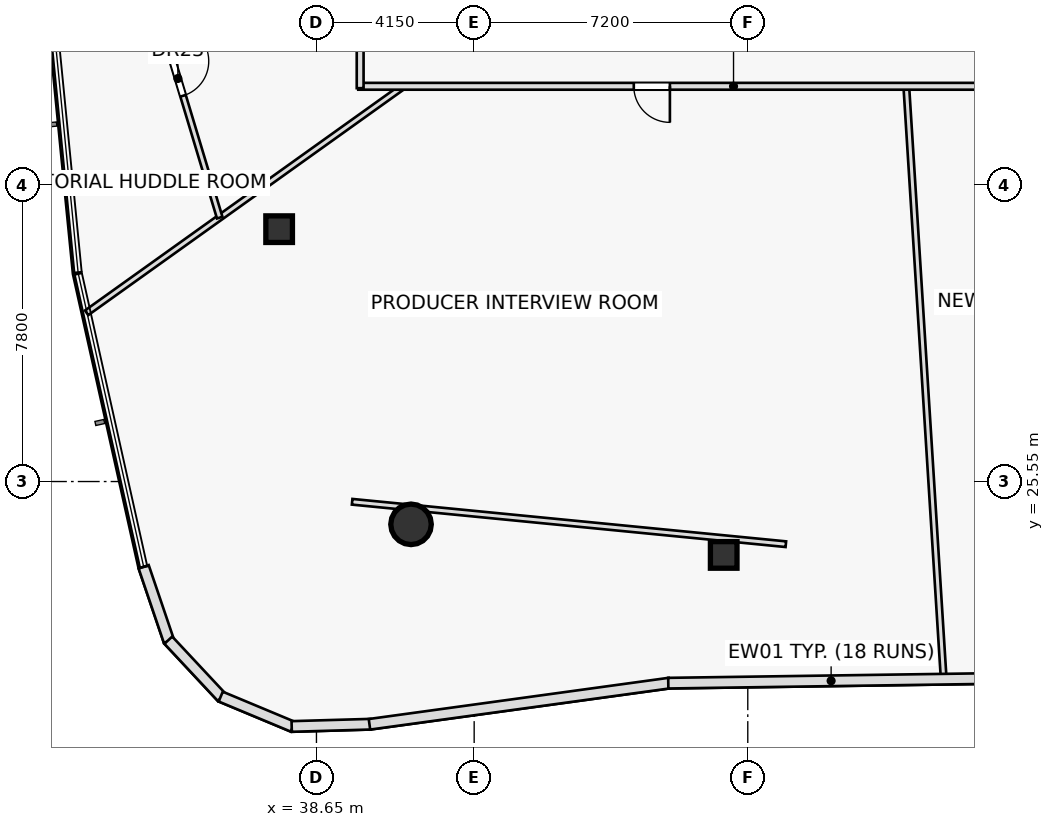
"""IFC4 building model, lengths in metres.
Left out: names, types, materials, properties, quantities, classifications, styles, units other than length and angle.
Written with IfcOpenShell. Run it as: python <this file> out.ifc"""

import sys

from ifc_helpers import new_model, si_unit, direction, frame, frame_2d, origin, origin_2d, place, context, subcontext, project, spatial, rectangle, hollow_rectangle, hollow_circle, extrude, element, fill, save


model = new_model("IFC4")
c1 = context("Model", 3, precision=1e-05, world=origin(), true_north=direction((0.0, 1.0)))
c2 = subcontext(c1, "Body", "Model", "MODEL_VIEW")
j1 = project(units=[si_unit("LENGTHUNIT", "METRE"), si_unit("PLANEANGLEUNIT", "RADIAN")], contexts=[c1])
p1 = place(None, origin())
s1 = spatial("IfcSite", under=j1, at=p1, CompositionType="ELEMENT")
p2 = place(p1, origin())
s2 = spatial("IfcBuilding", under=s1, at=p2, CompositionType="ELEMENT")
p3 = place(p2, frame((0.0, 0.0, 138.7)))
s3 = spatial("IfcBuildingStorey", under=s2, at=p3, CompositionType="ELEMENT", Elevation=138.7)
p4 = place(p3, frame((37.668, 32.19, 0.0), z_axis=(0.0, 0.0, 1.0), x_axis=(1.0, 0.0, 0.0)))
e1 = element("IfcColumn", 1, at=p4, inside=s3, PredefinedType="COLUMN", context=c2, shape_type="SweptSolid", body=[
    extrude(hollow_rectangle(XDim=0.7, YDim=0.7, WallThickness=0.04, at=origin_2d()), origin(), (0.0, 0.0, 1.0), 3.55),
])
p5 = place(p3, frame((41.139, 24.424, 0.0), z_axis=(0.0, 0.0, 1.0), x_axis=(1.0, 0.0, 0.0)))
e2 = element("IfcColumn", 2, at=p5, inside=s3, PredefinedType="COLUMN", context=c2, shape_type="SweptSolid", body=[
    extrude(hollow_circle(Radius=0.533, WallThickness=0.045, at=origin_2d()), origin(), (0.0, 0.0, 1.0), 3.55),
])
p6 = place(p3, frame((49.366, 23.619, 0.0), z_axis=(0.0, 0.0, 1.0), x_axis=(1.0, 0.0, 0.0)))
e3 = element("IfcColumn", 3, at=p6, inside=s3, PredefinedType="COLUMN", context=c2, shape_type="SweptSolid", body=[
    extrude(hollow_rectangle(XDim=0.7, YDim=0.7, WallThickness=0.04, at=origin_2d()), origin(), (0.0, 0.0, 1.0), 3.55),
])
p7 = place(p3, frame((39.589, 25.018, 0.0), z_axis=(0.0, 0.0, 1.0), x_axis=(0.99524905582, -0.097361783517, 0.0)))
e4 = element("IfcWall", 4, at=p7, inside=s3, PredefinedType="PARTITIONING", context=c2, shape_type="SweptSolid", body=[
    extrude(rectangle(XDim=11.467, YDim=0.15, at=frame_2d((5.733, 0.0))), origin(), (0.0, 0.0, 1.0), 2.835),
])
p8 = place(p3, frame((40.94, 35.95, 0.0), z_axis=(0.0, 0.0, 1.0), x_axis=(-0.813525786519, -0.581528842508, 0.0)))
e5 = element("IfcWall", 5, at=p8, inside=s3, PredefinedType="PARTITIONING", context=c2, shape_type="SweptSolid", body=[
    extrude(rectangle(XDim=10.249, YDim=0.15, at=frame_2d((5.125, 0.0))), origin(), (0.0, 0.0, 1.0), 2.835),
])
p9 = place(p3, frame((54.171, 35.95, 0.0), z_axis=(0.0, 0.0, 1.0), x_axis=(0.062994339198, -0.998013884287, 0.0)))
e6 = element("IfcWall", 6, at=p9, inside=s3, PredefinedType="PARTITIONING", context=c2, shape_type="SweptSolid", body=[
    extrude(rectangle(XDim=15.642, YDim=0.15, at=frame_2d((7.821, 0.0))), origin(), (0.0, 0.0, 1.0), 2.975),
])
p10 = place(p3, frame((33.902, 39.816, 0.0), z_axis=(0.0, 0.0, 1.0), x_axis=(0.288006845978, -0.957628349972, 0.0)))
e7 = element("IfcWall", 7, at=p10, inside=s3, PredefinedType="PARTITIONING", context=c2, shape_type="SweptSolid", body=[
    extrude(rectangle(XDim=7.647, YDim=0.15, at=frame_2d((3.823, 0.0))), origin(), (0.0, 0.0, 1.0), 3.55),
])
p11 = place(p10, frame((3.348, 0.0, 0.0)))
e8 = element("IfcOpeningElement", 8, at=p11, cuts=e7, PredefinedType="OPENING", context=c2, shape_type="SweptSolid", body=[
    extrude(rectangle(XDim=0.95, YDim=2.05, at=frame_2d((0.475, 1.025))), frame((0.0, 0.085, 0.0), z_axis=(0.0, -1.0, 0.0), x_axis=(1.0, 0.0, 0.0)), (0.0, 0.0, 1.0), 0.17),
])
p12 = place(p3, frame((59.5, 35.95, 0.0), z_axis=(0.0, 0.0, 1.0), x_axis=(-1.0, 0.0, 0.0)))
e9 = element("IfcWall", 9, at=p12, inside=s3, PredefinedType="PARTITIONING", context=c2, shape_type="SweptSolid", body=[
    extrude(rectangle(XDim=19.75, YDim=0.18, at=frame_2d((9.875, 0.0))), origin(), (0.0, 0.0, 1.0), 2.835),
])
p13 = place(p12, frame((2.304, 0.0, 0.0)))
e10 = element("IfcOpeningElement", 10, at=p13, cuts=e9, PredefinedType="OPENING", context=c2, shape_type="SweptSolid", body=[
    extrude(rectangle(XDim=0.95, YDim=2.05, at=frame_2d((0.475, 1.025))), frame((0.0, 0.1, 0.0), z_axis=(0.0, -1.0, 0.0), x_axis=(1.0, 0.0, 0.0)), (0.0, 0.0, 1.0), 0.2),
])
p14 = place(p12, frame((11.55, 0.0, 0.0)))
e11 = element("IfcOpeningElement", 11, at=p14, cuts=e9, PredefinedType="OPENING", context=c2, shape_type="SweptSolid", body=[
    extrude(rectangle(XDim=0.95, YDim=2.05, at=frame_2d((0.475, 1.025))), frame((0.0, 0.1, 0.0), z_axis=(0.0, -1.0, 0.0), x_axis=(1.0, 0.0, 0.0)), (0.0, 0.0, 1.0), 0.2),
])
p15 = place(p3, frame((39.8, 35.9, 0.0), z_axis=(0.0, 0.0, 1.0), x_axis=(0.0, 1.0, 0.0)))
e12 = element("IfcWall", 12, at=p15, inside=s3, PredefinedType="PARTITIONING", context=c2, shape_type="SweptSolid", body=[
    extrude(rectangle(XDim=4.35, YDim=0.18, at=frame_2d((2.175, 0.0))), origin(), (0.0, 0.0, 1.0), 2.835),
])
p16 = place(p15, frame((1.7, 0.0, 0.0)))
e13 = element("IfcOpeningElement", 13, at=p16, cuts=e12, PredefinedType="OPENING", context=c2, shape_type="SweptSolid", body=[
    extrude(rectangle(XDim=0.95, YDim=2.05, at=frame_2d((0.475, 1.025))), frame((0.0, 0.1, 0.0), z_axis=(0.0, -1.0, 0.0), x_axis=(1.0, 0.0, 0.0)), (0.0, 0.0, 1.0), 0.2),
])
p17 = place(p3, frame((34.103, 23.307, 0.0), z_axis=(0.0, 0.0, 1.0), x_axis=(0.321468503967, -0.9469202717, 0.0)))
e14 = element("IfcWall", 14, at=p17, inside=s3, PredefinedType="STANDARD", context=c2, shape_type="SweptSolid", body=[
    extrude(rectangle(XDim=2.066, YDim=0.28, at=frame_2d((1.033, 0.0))), origin(), (0.0, 0.0, 1.0), 3.55),
])
for number, where, z_axis, x_axis in (
    (15, (34.752, 21.375, 0.0), (0.0, 0.0, 1.0), (0.683, -0.731, 0.0)),
    (16, (36.131, 19.891, 0.0), (0.0, 0.0, 1.0), (0.923, -0.385, 0.0)),
):
    element("IfcWall", number, at=place(p3, frame(where, z_axis=z_axis, x_axis=x_axis)), inside=s3, PredefinedType="STANDARD", context=c2, shape_type="SweptSolid", body=[
        extrude(rectangle(XDim=2.055, YDim=0.28, at=frame_2d((1.027, 0.0))), origin(), (0.0, 0.0, 1.0), 3.55),
    ])
p18 = place(p3, frame((37.998, 19.105, 0.0), z_axis=(0.0, 0.0, 1.0), x_axis=(0.999585348395, 0.028794639666, 0.0)))
e17 = element("IfcWall", 17, at=p18, inside=s3, PredefinedType="STANDARD", context=c2, shape_type="SweptSolid", body=[
    extrude(rectangle(XDim=2.077, YDim=0.28, at=frame_2d((1.039, 0.0))), origin(), (0.0, 0.0, 1.0), 3.55),
])
p19 = place(p3, frame((40.045, 19.162, 0.0), z_axis=(0.0, 0.0, 1.0), x_axis=(0.990692791114, 0.136116838173, 0.0)))
e18 = element("IfcWall", 18, at=p19, inside=s3, PredefinedType="STANDARD", context=c2, shape_type="SweptSolid", body=[
    extrude(rectangle(XDim=7.967, YDim=0.28, at=frame_2d((3.984, 0.0))), origin(), (0.0, 0.0, 1.0), 3.55),
])
p20 = place(p3, frame((47.908, 20.244, 0.0), z_axis=(0.0, 0.0, 1.0), x_axis=(0.9998952895, 0.014471006725, 0.0)))
e19 = element("IfcWall", 19, at=p20, inside=s3, PredefinedType="STANDARD", context=c2, shape_type="SweptSolid", body=[
    extrude(rectangle(XDim=8.571, YDim=0.28, at=frame_2d((4.285, 0.0))), origin(), (0.0, 0.0, 1.0), 3.55),
])
p21 = place(p11, origin())
e20 = element("IfcDoor", 20, at=p21, inside=s3, OperationType="SINGLE_SWING_LEFT", PredefinedType="DOOR", context=c2, shape_type="SweptSolid", body=[
    extrude(rectangle(XDim=0.95, YDim=2.05, at=frame_2d((0.475, 1.025))), frame((0.0, 0.025, 0.0), z_axis=(0.0, -1.0, 0.0), x_axis=(1.0, 0.0, 0.0)), (0.0, 0.0, 1.0), 0.05),
])
fill(e8, e20)
p22 = place(p14, origin())
e21 = element("IfcDoor", 21, at=p22, inside=s3, OperationType="SINGLE_SWING_LEFT", PredefinedType="DOOR", context=c2, shape_type="SweptSolid", body=[
    extrude(rectangle(XDim=0.95, YDim=2.05, at=frame_2d((0.475, 1.025))), frame((0.0, 0.025, 0.0), z_axis=(0.0, -1.0, 0.0), x_axis=(1.0, 0.0, 0.0)), (0.0, 0.0, 1.0), 0.05),
])
fill(e11, e21)
save(model, sys.argv[1])
